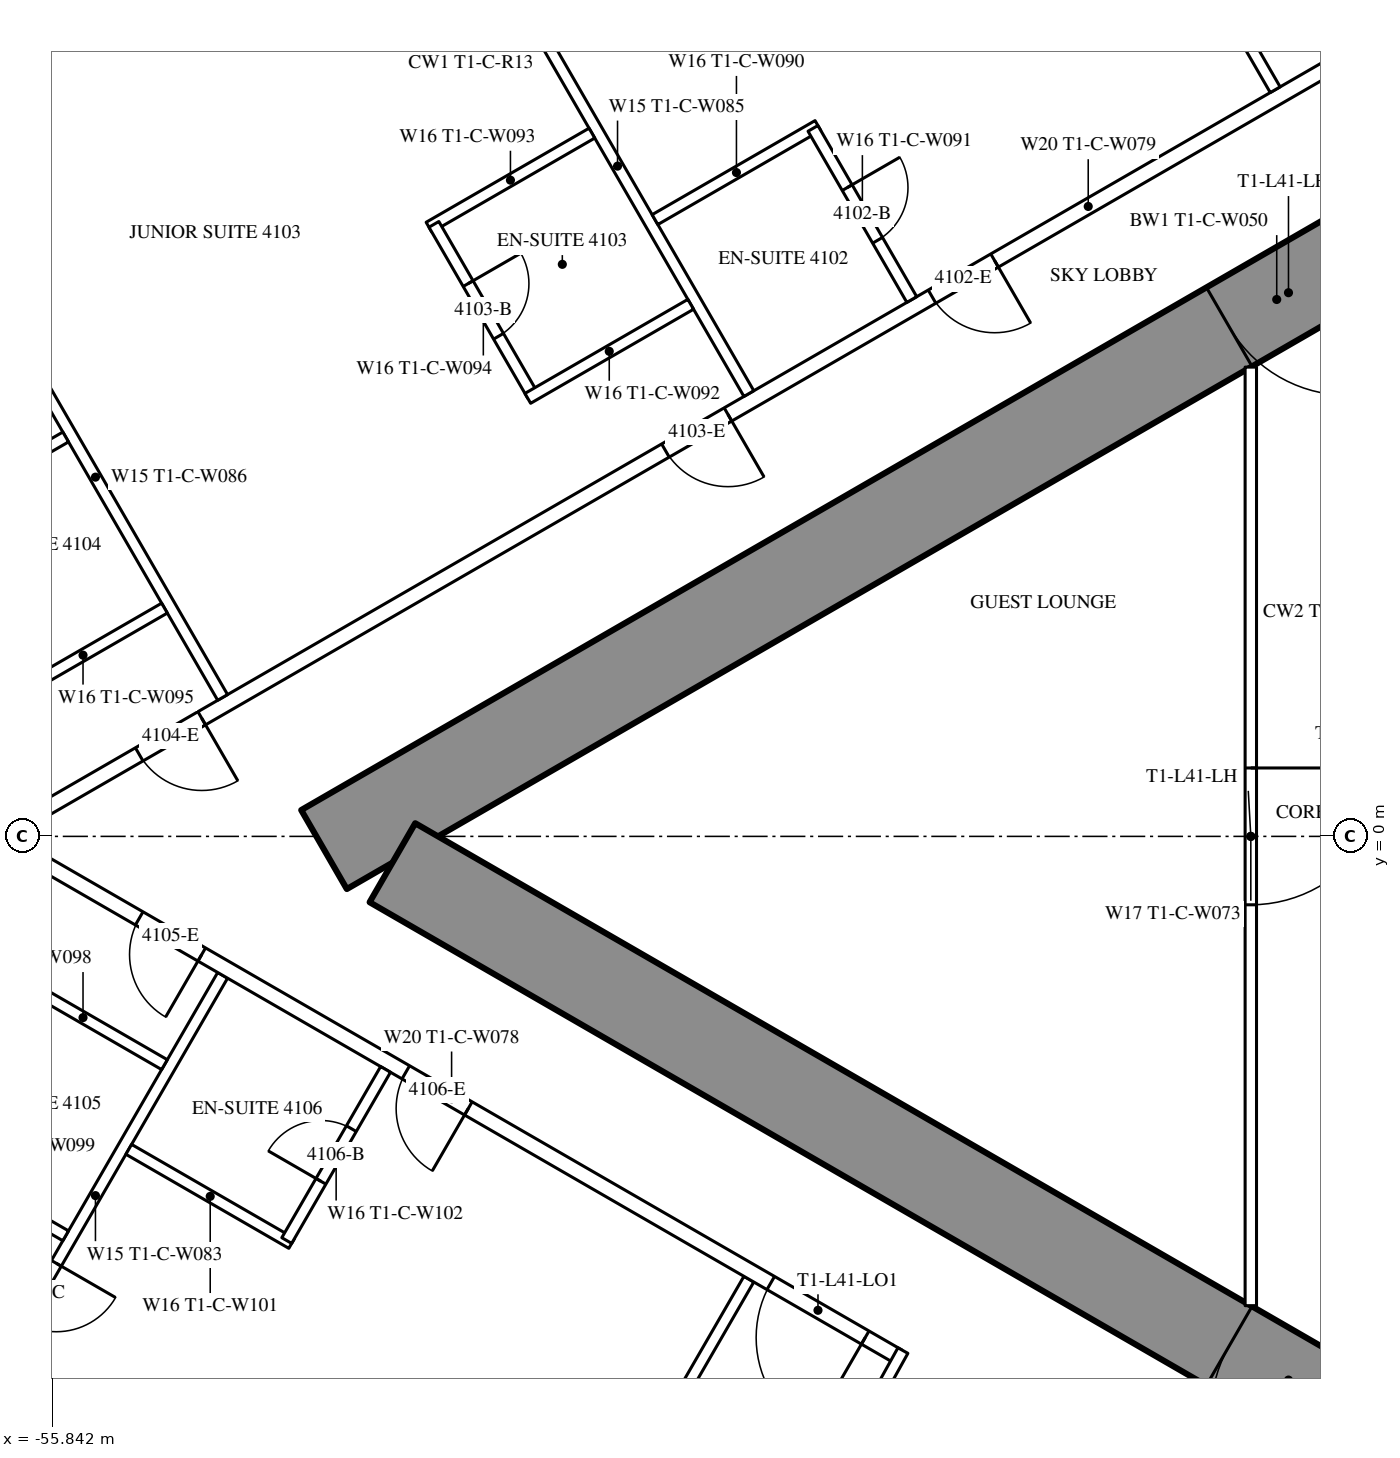
"""IFC4 building model, lengths in metres.
Left out: names, types, materials, properties, quantities, classifications, styles, units other than length and angle.
Written with IfcOpenShell. Run it as: python <this file> out.ifc"""

import sys

from ifc_helpers import new_model, si_unit, direction, frame, frame_2d, origin, place, context, subcontext, project, spatial, rectangle, extrude, element, fill, save


model = new_model("IFC4")
c1 = context("Model", 3, precision=1e-05, world=origin(), true_north=direction((0.0, 1.0)))
c2 = subcontext(c1, "Body", "Model", "MODEL_VIEW")
j1 = project(units=[si_unit("LENGTHUNIT", "METRE"), si_unit("PLANEANGLEUNIT", "RADIAN")], contexts=[c1])
p1 = place(None, origin())
s1 = spatial("IfcSite", under=j1, at=p1, CompositionType="ELEMENT")
p2 = place(p1, origin())
s2 = spatial("IfcBuilding", under=s1, at=p2, CompositionType="ELEMENT")
p3 = place(p2, frame((0.0, 0.0, 156.3)))
s3 = spatial("IfcBuildingStorey", under=s2, at=p3, CompositionType="ELEMENT", Elevation=156.3)
p4 = place(p3, frame((-27.2, 14.3, 0.0), z_axis=(0.0, 0.0, 1.0), x_axis=(-0.866026593062, -0.499997940104, 0.0)))
e1 = element("IfcWall", 1, at=p4, inside=s3, PredefinedType="SHEAR", context=c2, shape_type="SweptSolid", body=[
    extrude(rectangle(XDim=28.946, YDim=1.2, at=frame_2d((14.473, 0.0))), origin(), (0.0, 0.0, 1.0), 3.5),
])
p5 = place(p4, frame((4.6, 0.0, 0.0)))
e2 = element("IfcOpeningElement", 2, at=p5, cuts=e1, PredefinedType="OPENING", context=c2, shape_type="SweptSolid", body=[
    extrude(rectangle(XDim=1.0, YDim=2.2, at=frame_2d((0.5, 1.1))), frame((0.0, 0.61, 0.0), z_axis=(0.0, -1.0, 0.0), x_axis=(1.0, 0.0, 0.0)), (0.0, 0.0, 1.0), 1.22),
])
p6 = place(p4, frame((13.395, 0.0, 0.0)))
e3 = element("IfcOpeningElement", 3, at=p6, cuts=e1, PredefinedType="OPENING", context=c2, shape_type="SweptSolid", body=[
    extrude(rectangle(XDim=1.8, YDim=2.2, at=frame_2d((0.9, 1.1))), frame((0.0, 0.61, 0.0), z_axis=(0.0, -1.0, 0.0), x_axis=(1.0, 0.0, 0.0)), (0.0, 0.0, 1.0), 1.22),
])
p7 = place(p3, frame((-27.2, -14.3, 0.0), z_axis=(0.0, 0.0, 1.0), x_axis=(-0.866024021859, 0.500002393557, 0.0)))
e4 = element("IfcWall", 4, at=p7, inside=s3, PredefinedType="SHEAR", context=c2, shape_type="SweptSolid", body=[
    extrude(rectangle(XDim=27.907, YDim=1.2, at=frame_2d((13.954, 0.0))), origin(), (0.0, 0.0, 1.0), 3.5),
])
p8 = place(p7, frame((4.6, 0.0, 0.0)))
e5 = element("IfcOpeningElement", 5, at=p8, cuts=e4, PredefinedType="OPENING", context=c2, shape_type="SweptSolid", body=[
    extrude(rectangle(XDim=1.0, YDim=2.2, at=frame_2d((0.5, 1.1))), frame((0.0, 0.61, 0.0), z_axis=(0.0, -1.0, 0.0), x_axis=(1.0, 0.0, 0.0)), (0.0, 0.0, 1.0), 1.22),
])
p9 = place(p7, frame((13.395, 0.0, 0.0)))
e6 = element("IfcOpeningElement", 6, at=p9, cuts=e4, PredefinedType="OPENING", context=c2, shape_type="SweptSolid", body=[
    extrude(rectangle(XDim=1.8, YDim=2.2, at=frame_2d((0.9, 1.1))), frame((0.0, 0.61, 0.0), z_axis=(0.0, -1.0, 0.0), x_axis=(1.0, 0.0, 0.0)), (0.0, 0.0, 1.0), 1.22),
])
p10 = place(p3, frame((-27.86, 16.575, 0.0), z_axis=(0.0, 0.0, 1.0), x_axis=(-0.866025533911, -0.499999774615, 0.0)))
e7 = element("IfcWall", 7, at=p10, inside=s3, PredefinedType="PARTITIONING", context=c2, shape_type="SweptSolid", body=[
    extrude(rectangle(XDim=33.149, YDim=0.2, at=frame_2d((16.575, 0.0))), origin(), (0.0, 0.0, 1.0), 3.25),
])
p11 = place(p10, frame((3.75, 0.0, 0.0)))
e8 = element("IfcOpeningElement", 8, at=p11, cuts=e7, PredefinedType="OPENING", context=c2, shape_type="SweptSolid", body=[
    extrude(rectangle(XDim=1.0, YDim=2.2, at=frame_2d((0.5, 1.1))), frame((0.0, 0.11, 0.0), z_axis=(0.0, -1.0, 0.0), x_axis=(1.0, 0.0, 0.0)), (0.0, 0.0, 1.0), 0.22),
])
p12 = place(p10, frame((17.997, 0.0, 0.0)))
e9 = element("IfcOpeningElement", 9, at=p12, cuts=e7, PredefinedType="OPENING", context=c2, shape_type="SweptSolid", body=[
    extrude(rectangle(XDim=0.95, YDim=2.2, at=frame_2d((0.475, 1.1))), frame((0.0, 0.11, 0.0), z_axis=(0.0, -1.0, 0.0), x_axis=(1.0, 0.0, 0.0)), (0.0, 0.0, 1.0), 0.22),
])
p13 = place(p10, frame((22.047, 0.0, 0.0)))
e10 = element("IfcOpeningElement", 10, at=p13, cuts=e7, PredefinedType="OPENING", context=c2, shape_type="SweptSolid", body=[
    extrude(rectangle(XDim=0.95, YDim=2.2, at=frame_2d((0.475, 1.1))), frame((0.0, 0.11, 0.0), z_axis=(0.0, -1.0, 0.0), x_axis=(1.0, 0.0, 0.0)), (0.0, 0.0, 1.0), 0.22),
])
p14 = place(p10, frame((30.042, 0.0, 0.0)))
e11 = element("IfcOpeningElement", 11, at=p14, cuts=e7, PredefinedType="OPENING", context=c2, shape_type="SweptSolid", body=[
    extrude(rectangle(XDim=0.95, YDim=2.2, at=frame_2d((0.475, 1.1))), frame((0.0, 0.11, 0.0), z_axis=(0.0, -1.0, 0.0), x_axis=(1.0, 0.0, 0.0)), (0.0, 0.0, 1.0), 0.22),
])
p15 = place(p3, frame((-39.754, 9.823, 0.0), z_axis=(0.0, 0.0, 1.0), x_axis=(-0.499997670926, 0.866026748472, 0.0)))
e12 = element("IfcWall", 12, at=p15, inside=s3, PredefinedType="PARTITIONING", context=c2, shape_type="SweptSolid", body=[
    extrude(rectangle(XDim=6.757, YDim=0.15, at=frame_2d((3.379, 0.0))), origin(), (0.0, 0.0, 1.0), 2.3),
])
p16 = place(p3, frame((-46.679, 5.825, 0.0), z_axis=(0.0, 0.0, 1.0), x_axis=(-0.500006839597, 0.866021454905, 0.0)))
e13 = element("IfcWall", 13, at=p16, inside=s3, PredefinedType="PARTITIONING", context=c2, shape_type="SweptSolid", body=[
    extrude(rectangle(XDim=6.911, YDim=0.15, at=frame_2d((3.456, 0.0))), origin(), (0.0, 0.0, 1.0), 2.3),
])
p17 = place(p3, frame((-53.602, 1.828, 0.0), z_axis=(0.0, 0.0, 1.0), x_axis=(-0.49999191814, 0.866030069798, 0.0)))
e14 = element("IfcWall", 14, at=p17, inside=s3, PredefinedType="PARTITIONING", context=c2, shape_type="SweptSolid", body=[
    extrude(rectangle(XDim=6.692, YDim=0.15, at=frame_2d((3.346, 0.0))), origin(), (0.0, 0.0, 1.0), 2.3),
])
p18 = place(p3, frame((-46.679, -5.825, 0.0), z_axis=(0.0, 0.0, 1.0), x_axis=(-0.500006839597, -0.866021454905, 0.0)))
e15 = element("IfcWall", 15, at=p18, inside=s3, PredefinedType="PARTITIONING", context=c2, shape_type="SweptSolid", body=[
    extrude(rectangle(XDim=6.911, YDim=0.15, at=frame_2d((3.456, 0.0))), origin(), (0.0, 0.0, 1.0), 2.3),
])
p19 = place(p3, frame((-53.602, -1.828, 0.0), z_axis=(0.0, 0.0, 1.0), x_axis=(-0.49999191814, -0.866030069798, 0.0)))
e16 = element("IfcWall", 16, at=p19, inside=s3, PredefinedType="PARTITIONING", context=c2, shape_type="SweptSolid", body=[
    extrude(rectangle(XDim=6.692, YDim=0.15, at=frame_2d((3.346, 0.0))), origin(), (0.0, 0.0, 1.0), 2.3),
])
p20 = place(p19, frame((4.375, 0.0, 0.0)))
e17 = element("IfcOpeningElement", 17, at=p20, cuts=e16, PredefinedType="OPENING", context=c2, shape_type="SweptSolid", body=[
    extrude(rectangle(XDim=0.9, YDim=2.2, at=frame_2d((0.45, 1.1))), frame((0.0, 0.085, 0.0), z_axis=(0.0, -1.0, 0.0), x_axis=(1.0, 0.0, 0.0)), (0.0, 0.0, 1.0), 0.17),
])
p21 = place(p3, frame((-44.715, -6.844, 0.0), z_axis=(0.0, 0.0, 1.0), x_axis=(-0.866025261224, 0.500000246922, 0.0)))
e18 = element("IfcWall", 18, at=p21, inside=s3, PredefinedType="PARTITIONING", context=c2, shape_type="SweptSolid", body=[
    extrude(rectangle(XDim=13.567, YDim=0.2, at=frame_2d((6.783, 0.0))), origin(), (0.0, 0.0, 1.0), 3.25),
])
p22 = place(p21, frame((10.579, 0.0, 0.0)))
e19 = element("IfcOpeningElement", 19, at=p22, cuts=e18, PredefinedType="OPENING", context=c2, shape_type="SweptSolid", body=[
    extrude(rectangle(XDim=0.95, YDim=2.2, at=frame_2d((0.475, 1.1))), frame((0.0, 0.11, 0.0), z_axis=(0.0, -1.0, 0.0), x_axis=(1.0, 0.0, 0.0)), (0.0, 0.0, 1.0), 0.22),
])
p23 = place(p21, frame((6.529, 0.0, 0.0)))
e20 = element("IfcOpeningElement", 20, at=p23, cuts=e18, PredefinedType="OPENING", context=c2, shape_type="SweptSolid", body=[
    extrude(rectangle(XDim=0.95, YDim=2.2, at=frame_2d((0.475, 1.1))), frame((0.0, 0.11, 0.0), z_axis=(0.0, -1.0, 0.0), x_axis=(1.0, 0.0, 0.0)), (0.0, 0.0, 1.0), 0.22),
])
p24 = place(p21, frame((0.5, 0.0, 0.0)))
e21 = element("IfcOpeningElement", 21, at=p24, cuts=e18, PredefinedType="OPENING", context=c2, shape_type="SweptSolid", body=[
    extrude(rectangle(XDim=1.435, YDim=2.2, at=frame_2d((0.718, 1.1))), frame((0.0, 0.11, 0.0), z_axis=(0.0, -1.0, 0.0), x_axis=(1.0, 0.0, 0.0)), (0.0, 0.0, 1.0), 0.22),
])
p25 = place(p3, frame((-44.652, -6.764, 0.0), z_axis=(0.0, 0.0, 1.0), x_axis=(-0.485424724123, -0.874278466629, 0.0)))
e22 = element("IfcWall", 22, at=p25, inside=s3, PredefinedType="PARTITIONING", context=c2, shape_type="SweptSolid", body=[
    extrude(rectangle(XDim=1.805, YDim=0.15, at=frame_2d((0.903, 0.0))), origin(), (0.0, 0.0, 1.0), 3.25),
])
p26 = place(p3, frame((-45.771, 9.352, 0.0), z_axis=(0.0, 0.0, 1.0), x_axis=(-0.866006523861, -0.500032699561, 0.0)))
e23 = element("IfcWall", 23, at=p26, inside=s3, PredefinedType="PARTITIONING", context=c2, shape_type="SweptSolid", body=[
    extrude(rectangle(XDim=2.475, YDim=0.15, at=frame_2d((1.237, 0.0))), origin(), (0.0, 0.0, 1.0), 3.25),
])
p27 = place(p3, frame((-44.535, 7.063, 0.0), z_axis=(0.0, 0.0, 1.0), x_axis=(-0.500047596559, 0.865997922154, 0.0)))
e24 = element("IfcWall", 24, at=p27, inside=s3, PredefinedType="PARTITIONING", context=c2, shape_type="SweptSolid", body=[
    extrude(rectangle(XDim=2.6, YDim=0.15, at=frame_2d((1.3, 0.0))), origin(), (0.0, 0.0, 1.0), 3.25),
])
p28 = place(p27, frame((0.9, 0.0, 0.0)))
e25 = element("IfcOpeningElement", 25, at=p28, cuts=e24, PredefinedType="OPENING", context=c2, shape_type="SweptSolid", body=[
    extrude(rectangle(XDim=0.8, YDim=2.2, at=frame_2d((0.4, 1.1))), frame((0.0, 0.085, 0.0), z_axis=(0.0, -1.0, 0.0), x_axis=(1.0, 0.0, 0.0)), (0.0, 0.0, 1.0), 0.17),
])
p29 = place(p3, frame((-48.744, 9.252, 0.0), z_axis=(0.0, 0.0, 1.0), x_axis=(-0.866006523861, -0.500032699561, 0.0)))
e26 = element("IfcWall", 26, at=p29, inside=s3, PredefinedType="PARTITIONING", context=c2, shape_type="SweptSolid", body=[
    extrude(rectangle(XDim=2.475, YDim=0.15, at=frame_2d((1.237, 0.0))), origin(), (0.0, 0.0, 1.0), 3.25),
])
p30 = place(p3, frame((-49.522, 5.8, 0.0), z_axis=(0.0, 0.0, 1.0), x_axis=(-0.500006934395, 0.866021400173, 0.0)))
e27 = element("IfcWall", 27, at=p30, inside=s3, PredefinedType="PARTITIONING", context=c2, shape_type="SweptSolid", body=[
    extrude(rectangle(XDim=2.6, YDim=0.15, at=frame_2d((1.3, 0.0))), origin(), (0.0, 0.0, 1.0), 3.25),
])
p31 = place(p30, frame((0.9, 0.0, 0.0)))
e28 = element("IfcOpeningElement", 28, at=p31, cuts=e27, PredefinedType="OPENING", context=c2, shape_type="SweptSolid", body=[
    extrude(rectangle(XDim=0.8, YDim=2.2, at=frame_2d((0.4, 1.1))), frame((0.0, 0.085, 0.0), z_axis=(0.0, -1.0, 0.0), x_axis=(1.0, 0.0, 0.0)), (0.0, 0.0, 1.0), 0.17),
])
for number, where, z_axis, x_axis in (
    (29, (-47.444, 7.0, 0.0), (0.0, 0.0, 1.0), (-0.866, -0.5, 0.0)),
    (30, (-55.667, 5.255, 0.0), (0.0, 0.0, 1.0), (-0.866, -0.5, 0.0)),
):
    element("IfcWall", number, at=place(p3, frame(where, z_axis=z_axis, x_axis=x_axis)), inside=s3, PredefinedType="PARTITIONING", context=c2, shape_type="SweptSolid", body=[
        extrude(rectangle(XDim=2.475, YDim=0.15, at=frame_2d((1.237, 0.0))), origin(), (0.0, 0.0, 1.0), 3.25),
    ])
p32 = place(p3, frame((-54.367, 3.003, 0.0), z_axis=(0.0, 0.0, 1.0), x_axis=(-0.866031185235, -0.4999899861, 0.0)))
e31 = element("IfcWall", 31, at=p32, inside=s3, PredefinedType="PARTITIONING", context=c2, shape_type="SweptSolid", body=[
    extrude(rectangle(XDim=2.475, YDim=0.15, at=frame_2d((1.238, 0.0))), origin(), (0.0, 0.0, 1.0), 3.25),
])
p33 = place(p3, frame((-55.667, -5.255, 0.0), z_axis=(0.0, 0.0, 1.0), x_axis=(-0.866006523861, 0.500032699561, 0.0)))
e32 = element("IfcWall", 32, at=p33, inside=s3, PredefinedType="PARTITIONING", context=c2, shape_type="SweptSolid", body=[
    extrude(rectangle(XDim=2.475, YDim=0.15, at=frame_2d((1.237, 0.0))), origin(), (0.0, 0.0, 1.0), 3.25),
])
for number, where, z_axis, x_axis in (
    (33, (-54.367, -3.003, 0.0), (0.0, 0.0, 1.0), (-0.866, 0.5, 0.0)),
    (34, (-52.694, -5.355, 0.0), (0.0, 0.0, 1.0), (-0.866, 0.5, 0.0)),
):
    element("IfcWall", number, at=place(p3, frame(where, z_axis=z_axis, x_axis=x_axis)), inside=s3, PredefinedType="PARTITIONING", context=c2, shape_type="SweptSolid", body=[
        extrude(rectangle(XDim=2.475, YDim=0.15, at=frame_2d((1.238, 0.0))), origin(), (0.0, 0.0, 1.0), 3.25),
    ])
p34 = place(p3, frame((-51.459, -3.065, 0.0), z_axis=(0.0, 0.0, 1.0), x_axis=(-0.499936506574, -0.866062058628, 0.0)))
e35 = element("IfcWall", 35, at=p34, inside=s3, PredefinedType="PARTITIONING", context=c2, shape_type="SweptSolid", body=[
    extrude(rectangle(XDim=2.6, YDim=0.15, at=frame_2d((1.3, 0.0))), origin(), (0.0, 0.0, 1.0), 3.25),
])
p35 = place(p34, frame((0.9, 0.0, 0.0)))
e36 = element("IfcOpeningElement", 36, at=p35, cuts=e35, PredefinedType="OPENING", context=c2, shape_type="SweptSolid", body=[
    extrude(rectangle(XDim=0.8, YDim=2.2, at=frame_2d((0.4, 1.1))), frame((0.0, 0.085, 0.0), z_axis=(0.0, -1.0, 0.0), x_axis=(1.0, 0.0, 0.0)), (0.0, 0.0, 1.0), 0.17),
])
p36 = place(p3, frame((-40.075, 6.174, 0.0), z_axis=(0.0, 0.0, 1.0), x_axis=(0.0, -1.0, 0.0)))
e37 = element("IfcWall", 37, at=p36, inside=s3, PredefinedType="PARTITIONING", context=c2, shape_type="SweptSolid", body=[
    extrude(rectangle(XDim=12.348, YDim=0.15, at=frame_2d((6.174, 0.0))), origin(), (0.0, 0.0, 1.0), 3.25),
])
p37 = place(p36, frame((5.274, 0.0, 0.0)))
e38 = element("IfcOpeningElement", 38, at=p37, cuts=e37, PredefinedType="OPENING", context=c2, shape_type="SweptSolid", body=[
    extrude(rectangle(XDim=1.8, YDim=2.2, at=frame_2d((0.9, 1.1))), frame((0.0, 0.085, 0.0), z_axis=(0.0, -1.0, 0.0), x_axis=(1.0, 0.0, 0.0)), (0.0, 0.0, 1.0), 0.17),
])
p38 = place(p28, origin())
e39 = element("IfcDoor", 39, at=p38, inside=s3, OperationType="SINGLE_SWING_RIGHT", PredefinedType="DOOR", context=c2, shape_type="SweptSolid", body=[
    extrude(rectangle(XDim=0.8, YDim=2.2, at=frame_2d((0.4, 1.1))), frame((0.0, 0.025, 0.0), z_axis=(0.0, -1.0, 0.0), x_axis=(1.0, 0.0, 0.0)), (0.0, 0.0, 1.0), 0.05),
])
fill(e25, e39)
p39 = place(p12, origin())
e40 = element("IfcDoor", 40, at=p39, inside=s3, OperationType="SINGLE_SWING_LEFT", PredefinedType="DOOR", context=c2, shape_type="SweptSolid", body=[
    extrude(rectangle(XDim=0.95, YDim=2.2, at=frame_2d((0.475, 1.1))), frame((0.0, 0.025, 0.0), z_axis=(0.0, -1.0, 0.0), x_axis=(1.0, 0.0, 0.0)), (0.0, 0.0, 1.0), 0.05),
])
fill(e9, e40)
p40 = place(p31, origin())
e41 = element("IfcDoor", 41, at=p40, inside=s3, OperationType="SINGLE_SWING_RIGHT", PredefinedType="DOOR", context=c2, shape_type="SweptSolid", body=[
    extrude(rectangle(XDim=0.8, YDim=2.2, at=frame_2d((0.4, 1.1))), frame((0.0, 0.025, 0.0), z_axis=(0.0, -1.0, 0.0), x_axis=(1.0, 0.0, 0.0)), (0.0, 0.0, 1.0), 0.05),
])
fill(e28, e41)
p41 = place(p13, origin())
e42 = element("IfcDoor", 42, at=p41, inside=s3, OperationType="SINGLE_SWING_LEFT", PredefinedType="DOOR", context=c2, shape_type="SweptSolid", body=[
    extrude(rectangle(XDim=0.95, YDim=2.2, at=frame_2d((0.475, 1.1))), frame((0.0, 0.025, 0.0), z_axis=(0.0, -1.0, 0.0), x_axis=(1.0, 0.0, 0.0)), (0.0, 0.0, 1.0), 0.05),
])
fill(e10, e42)
p42 = place(p14, origin())
e43 = element("IfcDoor", 43, at=p42, inside=s3, OperationType="SINGLE_SWING_LEFT", PredefinedType="DOOR", context=c2, shape_type="SweptSolid", body=[
    extrude(rectangle(XDim=0.95, YDim=2.2, at=frame_2d((0.475, 1.1))), frame((0.0, 0.025, 0.0), z_axis=(0.0, -1.0, 0.0), x_axis=(1.0, 0.0, 0.0)), (0.0, 0.0, 1.0), 0.05),
])
fill(e11, e43)
p43 = place(p22, origin())
e44 = element("IfcDoor", 44, at=p43, inside=s3, OperationType="SINGLE_SWING_LEFT", PredefinedType="DOOR", context=c2, shape_type="SweptSolid", body=[
    extrude(rectangle(XDim=0.95, YDim=2.2, at=frame_2d((0.475, 1.1))), frame((0.0, 0.025, 0.0), z_axis=(0.0, -1.0, 0.0), x_axis=(1.0, 0.0, 0.0)), (0.0, 0.0, 1.0), 0.05),
])
fill(e19, e44)
p44 = place(p35, origin())
e45 = element("IfcDoor", 45, at=p44, inside=s3, OperationType="SINGLE_SWING_RIGHT", PredefinedType="DOOR", context=c2, shape_type="SweptSolid", body=[
    extrude(rectangle(XDim=0.8, YDim=2.2, at=frame_2d((0.4, 1.1))), frame((0.0, 0.025, 0.0), z_axis=(0.0, -1.0, 0.0), x_axis=(1.0, 0.0, 0.0)), (0.0, 0.0, 1.0), 0.05),
])
fill(e36, e45)
p45 = place(p23, origin())
e46 = element("IfcDoor", 46, at=p45, inside=s3, OperationType="SINGLE_SWING_LEFT", PredefinedType="DOOR", context=c2, shape_type="SweptSolid", body=[
    extrude(rectangle(XDim=0.95, YDim=2.2, at=frame_2d((0.475, 1.1))), frame((0.0, 0.025, 0.0), z_axis=(0.0, -1.0, 0.0), x_axis=(1.0, 0.0, 0.0)), (0.0, 0.0, 1.0), 0.05),
])
fill(e20, e46)
p46 = place(p24, origin())
e47 = element("IfcDoor", 47, at=p46, inside=s3, OperationType="SINGLE_SWING_LEFT", PredefinedType="DOOR", context=c2, shape_type="SweptSolid", body=[
    extrude(rectangle(XDim=1.435, YDim=2.2, at=frame_2d((0.718, 1.1))), frame((0.0, 0.025, 0.0), z_axis=(0.0, -1.0, 0.0), x_axis=(1.0, 0.0, 0.0)), (0.0, 0.0, 1.0), 0.05),
])
fill(e21, e47)
p47 = place(p20, origin())
e48 = element("IfcDoor", 48, at=p47, inside=s3, OperationType="SINGLE_SWING_LEFT", PredefinedType="DOOR", context=c2, shape_type="SweptSolid", body=[
    extrude(rectangle(XDim=0.9, YDim=2.2, at=frame_2d((0.45, 1.1))), frame((0.0, 0.025, 0.0), z_axis=(0.0, -1.0, 0.0), x_axis=(1.0, 0.0, 0.0)), (0.0, 0.0, 1.0), 0.05),
])
fill(e17, e48)
p48 = place(p37, origin())
e49 = element("IfcDoor", 49, at=p48, inside=s3, OperationType="DOUBLE_DOOR_SINGLE_SWING", PredefinedType="DOOR", context=c2, shape_type="SweptSolid", body=[
    extrude(rectangle(XDim=1.8, YDim=2.2, at=frame_2d((0.9, 1.1))), frame((0.0, 0.025, 0.0), z_axis=(0.0, -1.0, 0.0), x_axis=(1.0, 0.0, 0.0)), (0.0, 0.0, 1.0), 0.05),
])
fill(e38, e49)
p49 = place(p6, origin())
e50 = element("IfcDoor", 50, at=p49, inside=s3, OperationType="DOUBLE_DOOR_SINGLE_SWING", PredefinedType="DOOR", context=c2, shape_type="SweptSolid", body=[
    extrude(rectangle(XDim=1.8, YDim=2.2, at=frame_2d((0.9, 1.1))), frame((0.0, 0.025, 0.0), z_axis=(0.0, -1.0, 0.0), x_axis=(1.0, 0.0, 0.0)), (0.0, 0.0, 1.0), 0.05),
])
fill(e3, e50)
p50 = place(p9, origin())
e51 = element("IfcDoor", 51, at=p50, inside=s3, OperationType="DOUBLE_DOOR_SINGLE_SWING", PredefinedType="DOOR", context=c2, shape_type="SweptSolid", body=[
    extrude(rectangle(XDim=1.8, YDim=2.2, at=frame_2d((0.9, 1.1))), frame((0.0, 0.025, 0.0), z_axis=(0.0, -1.0, 0.0), x_axis=(1.0, 0.0, 0.0)), (0.0, 0.0, 1.0), 0.05),
])
fill(e6, e51)
save(model, sys.argv[1])
